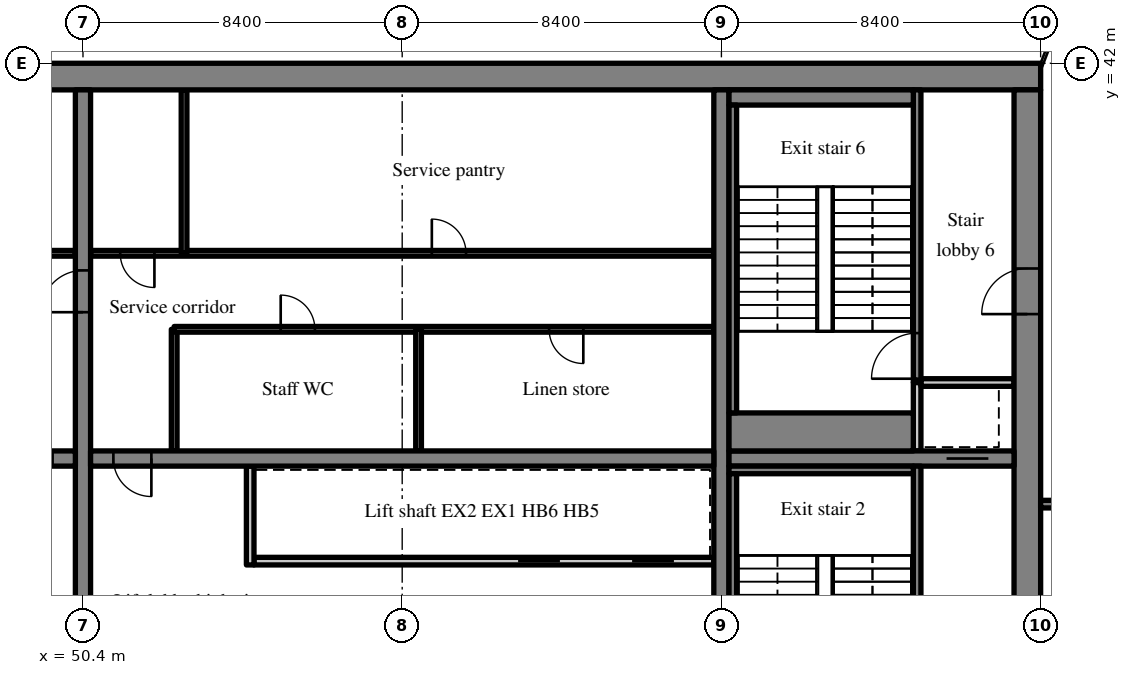
"""IFC4 building model, lengths in metres.
Left out: names, types, materials, properties, quantities, classifications, styles, units other than length and angle.
Written with IfcOpenShell. Run it as: python <this file> out.ifc"""

import sys

from ifc_helpers import new_model, si_unit, direction, frame, frame_2d, origin, place, context, subcontext, project, spatial, rectangle, extrude, source, transform, mapped, element, fill, save


model = new_model("IFC4")
c1 = context("Model", 3, precision=1e-05, world=origin(), true_north=direction((0.0, 1.0)))
c2 = subcontext(c1, "Body", "Model", "MODEL_VIEW")
j1 = project(units=[si_unit("LENGTHUNIT", "METRE"), si_unit("PLANEANGLEUNIT", "RADIAN")], contexts=[c1])
p1 = place(None, origin())
s1 = spatial("IfcSite", under=j1, at=p1, CompositionType="ELEMENT")
p2 = place(p1, origin())
s2 = spatial("IfcBuilding", under=s1, at=p2, CompositionType="ELEMENT")
p3 = place(p2, frame((0.0, 0.0, 155.4)))
s3 = spatial("IfcBuildingStorey", under=s2, at=p3, CompositionType="ELEMENT", Elevation=155.4)
m1 = source(origin(), c2, "Body", "SweptSolid", [
    extrude(rectangle(XDim=50.4, YDim=0.7, at=frame_2d((25.2, 0.0))), origin(), (0.0, 0.0, 1.0), 3.52),
])
p4 = place(p3, frame((25.2, 41.65, 0.0), z_axis=(0.0, 0.0, 1.0), x_axis=(1.0, 0.0, 0.0)))
e1 = element("IfcWall", 1, at=p4, inside=s3, PredefinedType="SHEAR", context=c2, shape_type="MappedRepresentation", body=[
    mapped(m1, transform((0.0, 0.0, 0.0), scale=1.0)),
])
m2 = source(origin(), c2, "Body", "SweptSolid", [
    extrude(rectangle(XDim=18.6, YDim=0.7, at=frame_2d((9.3, 0.0))), origin(), (0.0, 0.0, 1.0), 3.52),
])
p5 = place(p3, frame((75.25, 22.7, 0.0), z_axis=(0.0, 0.0, 1.0), x_axis=(0.0, 1.0, 0.0)))
e2 = element("IfcWall", 2, at=p5, inside=s3, PredefinedType="SHEAR", context=c2, shape_type="MappedRepresentation", body=[
    mapped(m2, transform((0.0, 0.0, 0.0), scale=1.0)),
])
m3 = source(origin(), c2, "Body", "SweptSolid", [
    extrude(rectangle(XDim=1.0, YDim=2.1, at=frame_2d((0.5, 1.05))), frame((0.0, 0.36, 0.0), z_axis=(0.0, -1.0, 0.0), x_axis=(1.0, 0.0, 0.0)), (0.0, 0.0, 1.0), 0.72),
])
p6 = place(p5, frame((2.8, 0.0, 0.0)))
e3 = element("IfcOpeningElement", 3, at=p6, cuts=e2, PredefinedType="OPENING", context=c2, shape_type="MappedRepresentation", body=[
    mapped(m3, transform((0.0, 0.0, 0.0), scale=1.0)),
])
m4 = source(origin(), c2, "Body", "SweptSolid", [
    extrude(rectangle(XDim=1.2, YDim=2.1, at=frame_2d((0.6, 1.05))), frame((0.0, 0.36, 0.0), z_axis=(0.0, -1.0, 0.0), x_axis=(1.0, 0.0, 0.0)), (0.0, 0.0, 1.0), 0.72),
])
p7 = place(p5, frame((12.7, 0.0, 0.0)))
e4 = element("IfcOpeningElement", 4, at=p7, cuts=e2, PredefinedType="OPENING", context=c2, shape_type="MappedRepresentation", body=[
    mapped(m4, transform((0.0, 0.0, 0.0), scale=1.0)),
])
m5 = source(origin(), c2, "Body", "SweptSolid", [
    extrude(rectangle(XDim=18.6, YDim=0.4, at=frame_2d((9.3, 0.0))), origin(), (0.0, 0.0, 1.0), 3.52),
])
p8 = place(p3, frame((50.4, 22.7, 0.0), z_axis=(0.0, 0.0, 1.0), x_axis=(0.0, 1.0, 0.0)))
e5 = element("IfcWall", 5, at=p8, inside=s3, PredefinedType="SHEAR", context=c2, shape_type="MappedRepresentation", body=[
    mapped(m5, transform((0.0, 0.0, 0.0), scale=1.0)),
])
m6 = source(origin(), c2, "Body", "SweptSolid", [
    extrude(rectangle(XDim=1.1, YDim=2.1, at=frame_2d((0.55, 1.05))), frame((0.0, 0.21, 0.0), z_axis=(0.0, -1.0, 0.0), x_axis=(1.0, 0.0, 0.0)), (0.0, 0.0, 1.0), 0.42),
])
p9 = place(p8, frame((12.75, 0.0, 0.0)))
e6 = element("IfcOpeningElement", 6, at=p9, cuts=e5, PredefinedType="OPENING", context=c2, shape_type="MappedRepresentation", body=[
    mapped(m6, transform((0.0, 0.0, 0.0), scale=1.0)),
])
p10 = place(p3, frame((67.2, 22.7, 0.0), z_axis=(0.0, 0.0, 1.0), x_axis=(0.0, 1.0, 0.0)))
e7 = element("IfcWall", 7, at=p10, inside=s3, PredefinedType="SHEAR", context=c2, shape_type="MappedRepresentation", body=[
    mapped(m5, transform((0.0, 0.0, 0.0), scale=1.0)),
])
m7 = source(origin(), c2, "Body", "SweptSolid", [
    extrude(rectangle(XDim=16.4, YDim=0.4, at=frame_2d((8.2, 0.0))), origin(), (0.0, 0.0, 1.0), 3.52),
])
p11 = place(p3, frame((33.8, 31.6, 0.0), z_axis=(0.0, 0.0, 1.0), x_axis=(1.0, 0.0, 0.0)))
e8 = element("IfcWall", 8, at=p11, inside=s3, PredefinedType="SHEAR", context=c2, shape_type="MappedRepresentation", body=[
    mapped(m7, transform((0.0, 0.0, 0.0), scale=1.0)),
])
m8 = source(origin(), c2, "Body", "SweptSolid", [
    extrude(rectangle(XDim=1.0, YDim=2.1, at=frame_2d((0.5, 1.05))), frame((0.0, 0.21, 0.0), z_axis=(0.0, -1.0, 0.0), x_axis=(1.0, 0.0, 0.0)), (0.0, 0.0, 1.0), 0.42),
])
p12 = place(p11, frame((14.8, 0.0, 0.0)))
e9 = element("IfcOpeningElement", 9, at=p12, cuts=e8, PredefinedType="OPENING", context=c2, shape_type="MappedRepresentation", body=[
    mapped(m8, transform((0.0, 0.0, 0.0), scale=1.0)),
])
p13 = place(p3, frame((50.6, 31.6, 0.0), z_axis=(0.0, 0.0, 1.0), x_axis=(1.0, 0.0, 0.0)))
e10 = element("IfcWall", 10, at=p13, inside=s3, PredefinedType="SHEAR", context=c2, shape_type="MappedRepresentation", body=[
    mapped(m7, transform((0.0, 0.0, 0.0), scale=1.0)),
])
p14 = place(p13, frame((0.6, 0.0, 0.0)))
e11 = element("IfcOpeningElement", 11, at=p14, cuts=e10, PredefinedType="OPENING", context=c2, shape_type="MappedRepresentation", body=[
    mapped(m8, transform((0.0, 0.0, 0.0), scale=1.0)),
])
m9 = source(origin(), c2, "Body", "SweptSolid", [
    extrude(rectangle(XDim=7.5, YDim=0.4, at=frame_2d((3.75, 0.0))), origin(), (0.0, 0.0, 1.0), 3.52),
])
p15 = place(p3, frame((67.4, 31.6, 0.0), z_axis=(0.0, 0.0, 1.0), x_axis=(1.0, 0.0, 0.0)))
e12 = element("IfcWall", 12, at=p15, inside=s3, PredefinedType="SHEAR", context=c2, shape_type="MappedRepresentation", body=[
    mapped(m9, transform((0.0, 0.0, 0.0), scale=1.0)),
])
p16 = place(p15, frame((5.725, 0.0, 0.0)))
e13 = element("IfcOpeningElement", 13, at=p16, cuts=e12, PredefinedType="OPENING", context=c2, shape_type="MappedRepresentation", body=[
    mapped(m6, transform((0.0, 0.0, 0.0), scale=1.0)),
])
m10 = source(origin(), c2, "Body", "SweptSolid", [
    extrude(rectangle(XDim=16.4, YDim=0.15, at=frame_2d((8.2, 0.0))), origin(), (0.0, 0.0, 1.0), 3.52),
])
p17 = place(p3, frame((33.8, 37.0, 0.0), z_axis=(0.0, 0.0, 1.0), x_axis=(1.0, 0.0, 0.0)))
e14 = element("IfcWall", 14, at=p17, inside=s3, PredefinedType="PARTITIONING", context=c2, shape_type="MappedRepresentation", body=[
    mapped(m10, transform((0.0, 0.0, 0.0), scale=1.0)),
])
m11 = source(origin(), c2, "Body", "SweptSolid", [
    extrude(rectangle(XDim=0.9, YDim=2.1, at=frame_2d((0.45, 1.05))), frame((0.0, 0.085, 0.0), z_axis=(0.0, -1.0, 0.0), x_axis=(1.0, 0.0, 0.0)), (0.0, 0.0, 1.0), 0.17),
])
p18 = place(p17, frame((0.78, 0.0, 0.0)))
e15 = element("IfcOpeningElement", 15, at=p18, cuts=e14, PredefinedType="OPENING", context=c2, shape_type="MappedRepresentation", body=[
    mapped(m11, transform((0.0, 0.0, 0.0), scale=1.0)),
])
p19 = place(p17, frame((3.65, 0.0, 0.0)))
e16 = element("IfcOpeningElement", 16, at=p19, cuts=e14, PredefinedType="OPENING", context=c2, shape_type="MappedRepresentation", body=[
    mapped(m11, transform((0.0, 0.0, 0.0), scale=1.0)),
])
p20 = place(p17, frame((9.39, 0.0, 0.0)))
e17 = element("IfcOpeningElement", 17, at=p20, cuts=e14, PredefinedType="OPENING", context=c2, shape_type="MappedRepresentation", body=[
    mapped(m11, transform((0.0, 0.0, 0.0), scale=1.0)),
])
p21 = place(p17, frame((14.72, 0.0, 0.0)))
e18 = element("IfcOpeningElement", 18, at=p21, cuts=e14, PredefinedType="OPENING", context=c2, shape_type="MappedRepresentation", body=[
    mapped(m11, transform((0.0, 0.0, 0.0), scale=1.0)),
])
m12 = source(origin(), c2, "Body", "SweptSolid", [
    extrude(rectangle(XDim=12.1, YDim=0.2, at=frame_2d((6.05, 0.0))), origin(), (0.0, 0.0, 1.0), 3.52),
])
p22 = place(p3, frame((67.0, 28.9, 0.0), z_axis=(0.0, 0.0, 1.0), x_axis=(-1.0, 0.0, 0.0)))
e19 = element("IfcWall", 19, at=p22, inside=s3, PredefinedType="SOLIDWALL", context=c2, shape_type="MappedRepresentation", body=[
    mapped(m12, transform((0.0, 0.0, 0.0), scale=1.0)),
])
m13 = source(origin(), c2, "Body", "SweptSolid", [
    extrude(rectangle(XDim=1.1, YDim=2.1, at=frame_2d((0.55, 1.05))), frame((0.0, 0.11, 0.0), z_axis=(0.0, -1.0, 0.0), x_axis=(1.0, 0.0, 0.0)), (0.0, 0.0, 1.0), 0.22),
])
p23 = place(p22, frame((1.05, 0.0, 0.0)))
e20 = element("IfcOpeningElement", 20, at=p23, cuts=e19, PredefinedType="OPENING", context=c2, shape_type="MappedRepresentation", body=[
    mapped(m13, transform((0.0, 0.0, 0.0), scale=1.0)),
])
p24 = place(p22, frame((4.05, 0.0, 0.0)))
e21 = element("IfcOpeningElement", 21, at=p24, cuts=e19, PredefinedType="OPENING", context=c2, shape_type="MappedRepresentation", body=[
    mapped(m13, transform((0.0, 0.0, 0.0), scale=1.0)),
])
m14 = source(origin(), c2, "Body", "SweptSolid", [
    extrude(rectangle(XDim=2.6, YDim=0.2, at=frame_2d((1.3, 0.0))), origin(), (0.0, 0.0, 1.0), 3.52),
])
p25 = place(p3, frame((54.8, 28.8, 0.0), z_axis=(0.0, 0.0, 1.0), x_axis=(0.0, 1.0, 0.0)))
e22 = element("IfcWall", 22, at=p25, inside=s3, PredefinedType="SOLIDWALL", context=c2, shape_type="MappedRepresentation", body=[
    mapped(m14, transform((0.0, 0.0, 0.0), scale=1.0)),
])
m15 = source(origin(), c2, "Body", "SweptSolid", [
    extrude(rectangle(XDim=3.2, YDim=0.15, at=frame_2d((1.6, 0.0))), origin(), (0.0, 0.0, 1.0), 3.52),
])
p26 = place(p3, frame((52.8, 31.8, 0.0), z_axis=(0.0, 0.0, 1.0), x_axis=(0.0, 1.0, 0.0)))
e23 = element("IfcWall", 23, at=p26, inside=s3, PredefinedType="PARTITIONING", context=c2, shape_type="MappedRepresentation", body=[
    mapped(m15, transform((0.0, 0.0, 0.0), scale=1.0)),
])
m16 = source(origin(), c2, "Body", "SweptSolid", [
    extrude(rectangle(XDim=14.2, YDim=0.15, at=frame_2d((7.1, 0.0))), origin(), (0.0, 0.0, 1.0), 3.52),
])
p27 = place(p3, frame((67.0, 35.0, 0.0), z_axis=(0.0, 0.0, 1.0), x_axis=(-1.0, 0.0, 0.0)))
e24 = element("IfcWall", 24, at=p27, inside=s3, PredefinedType="PARTITIONING", context=c2, shape_type="MappedRepresentation", body=[
    mapped(m16, transform((0.0, 0.0, 0.0), scale=1.0)),
])
p28 = place(p27, frame((3.434, 0.0, 0.0)))
e25 = element("IfcOpeningElement", 25, at=p28, cuts=e24, PredefinedType="OPENING", context=c2, shape_type="MappedRepresentation", body=[
    mapped(m11, transform((0.0, 0.0, 0.0), scale=1.0)),
])
p29 = place(p27, frame((10.497, 0.0, 0.0)))
e26 = element("IfcOpeningElement", 26, at=p29, cuts=e24, PredefinedType="OPENING", context=c2, shape_type="MappedRepresentation", body=[
    mapped(m11, transform((0.0, 0.0, 0.0), scale=1.0)),
])
p30 = place(p3, frame((67.0, 37.0, 0.0), z_axis=(0.0, 0.0, 1.0), x_axis=(-1.0, 0.0, 0.0)))
e27 = element("IfcWall", 27, at=p30, inside=s3, PredefinedType="PARTITIONING", context=c2, shape_type="MappedRepresentation", body=[
    mapped(m10, transform((0.0, 0.0, 0.0), scale=1.0)),
])
p31 = place(p30, frame((6.52, 0.0, 0.0)))
e28 = element("IfcOpeningElement", 28, at=p31, cuts=e27, PredefinedType="OPENING", context=c2, shape_type="MappedRepresentation", body=[
    mapped(m11, transform((0.0, 0.0, 0.0), scale=1.0)),
])
p32 = place(p30, frame((14.72, 0.0, 0.0)))
e29 = element("IfcOpeningElement", 29, at=p32, cuts=e27, PredefinedType="OPENING", context=c2, shape_type="MappedRepresentation", body=[
    mapped(m11, transform((0.0, 0.0, 0.0), scale=1.0)),
])
p33 = place(p3, frame((59.231, 31.8, 0.0), z_axis=(0.0, 0.0, 1.0), x_axis=(0.0, 1.0, 0.0)))
e30 = element("IfcWall", 30, at=p33, inside=s3, PredefinedType="PARTITIONING", context=c2, shape_type="MappedRepresentation", body=[
    mapped(m15, transform((0.0, 0.0, 0.0), scale=1.0)),
])
m17 = source(origin(), c2, "Body", "SweptSolid", [
    extrude(rectangle(XDim=4.3, YDim=0.15, at=frame_2d((2.15, 0.0))), origin(), (0.0, 0.0, 1.0), 3.52),
])
p34 = place(p3, frame((53.06, 37.0, 0.0), z_axis=(0.0, 0.0, 1.0), x_axis=(0.0, 1.0, 0.0)))
e31 = element("IfcWall", 31, at=p34, inside=s3, PredefinedType="PARTITIONING", context=c2, shape_type="MappedRepresentation", body=[
    mapped(m17, transform((0.0, 0.0, 0.0), scale=1.0)),
])
m18 = source(origin(), c2, "Body", "SweptSolid", [
    extrude(rectangle(XDim=8.7, YDim=0.2, at=frame_2d((4.35, 0.0))), origin(), (0.0, 0.0, 1.0), 3.52),
])
p35 = place(p3, frame((72.35, 22.7, 0.0), z_axis=(0.0, 0.0, 1.0), x_axis=(0.0, 1.0, 0.0)))
e32 = element("IfcWall", 32, at=p35, inside=s3, PredefinedType="SOLIDWALL", context=c2, shape_type="MappedRepresentation", body=[
    mapped(m18, transform((0.0, 0.0, 0.0), scale=1.0)),
])
m19 = source(origin(), c2, "Body", "SweptSolid", [
    extrude(rectangle(XDim=1.2, YDim=2.1, at=frame_2d((0.6, 1.05))), frame((0.0, 0.11, 0.0), z_axis=(0.0, -1.0, 0.0), x_axis=(1.0, 0.0, 0.0)), (0.0, 0.0, 1.0), 0.22),
])
p36 = place(p35, frame((0.9, 0.0, 0.0)))
e33 = element("IfcOpeningElement", 33, at=p36, cuts=e32, PredefinedType="OPENING", context=c2, shape_type="MappedRepresentation", body=[
    mapped(m19, transform((0.0, 0.0, 0.0), scale=1.0)),
])
m20 = source(origin(), c2, "Body", "SweptSolid", [
    extrude(rectangle(XDim=1.8, YDim=0.2, at=frame_2d((0.9, 0.0))), origin(), (0.0, 0.0, 1.0), 3.52),
])
p37 = place(p3, frame((72.35, 31.8, 0.0), z_axis=(0.0, 0.0, 1.0), x_axis=(0.0, 1.0, 0.0)))
e34 = element("IfcWall", 34, at=p37, inside=s3, PredefinedType="SOLIDWALL", context=c2, shape_type="MappedRepresentation", body=[
    mapped(m20, transform((0.0, 0.0, 0.0), scale=1.0)),
])
m21 = source(origin(), c2, "Body", "SweptSolid", [
    extrude(rectangle(XDim=2.45, YDim=0.2, at=frame_2d((1.225, 0.0))), origin(), (0.0, 0.0, 1.0), 3.52),
])
p38 = place(p3, frame((72.45, 33.6, 0.0), z_axis=(0.0, 0.0, 1.0), x_axis=(1.0, 0.0, 0.0)))
e35 = element("IfcWall", 35, at=p38, inside=s3, PredefinedType="SOLIDWALL", context=c2, shape_type="MappedRepresentation", body=[
    mapped(m21, transform((0.0, 0.0, 0.0), scale=1.0)),
])
m22 = source(origin(), c2, "Body", "SweptSolid", [
    extrude(rectangle(XDim=7.7, YDim=0.2, at=frame_2d((3.85, 0.0))), origin(), (0.0, 0.0, 1.0), 3.52),
])
p39 = place(p3, frame((72.35, 33.6, 0.0), z_axis=(0.0, 0.0, 1.0), x_axis=(0.0, 1.0, 0.0)))
e36 = element("IfcWall", 36, at=p39, inside=s3, PredefinedType="SOLIDWALL", context=c2, shape_type="MappedRepresentation", body=[
    mapped(m22, transform((0.0, 0.0, 0.0), scale=1.0)),
])
p40 = place(p39, frame((0.1, 0.0, 0.0)))
e37 = element("IfcOpeningElement", 37, at=p40, cuts=e36, PredefinedType="OPENING", context=c2, shape_type="MappedRepresentation", body=[
    mapped(m19, transform((0.0, 0.0, 0.0), scale=1.0)),
])
m23 = source(origin(), c2, "Body", "SweptSolid", [
    extrude(rectangle(XDim=8.25, YDim=0.2, at=frame_2d((4.125, 0.0))), origin(), (0.0, 0.0, 1.0), 3.52),
])
p41 = place(p3, frame((83.85, 30.4, 0.0), z_axis=(0.0, 0.0, 1.0), x_axis=(-1.0, 0.0, 0.0)))
e38 = element("IfcWall", 38, at=p41, inside=s3, PredefinedType="SOLIDWALL", context=c2, shape_type="MappedRepresentation", body=[
    mapped(m23, transform((0.0, 0.0, 0.0), scale=1.0)),
])
m24 = source(origin(), c2, "Body", "SweptSolid", [
    extrude(rectangle(XDim=1.0, YDim=2.1, at=frame_2d((0.5, 1.05))), frame((0.0, 0.11, 0.0), z_axis=(0.0, -1.0, 0.0), x_axis=(1.0, 0.0, 0.0)), (0.0, 0.0, 1.0), 0.22),
])
p42 = place(p41, frame((6.15, 0.0, 0.0)))
e39 = element("IfcOpeningElement", 39, at=p42, cuts=e38, PredefinedType="OPENING", context=c2, shape_type="MappedRepresentation", body=[
    mapped(m24, transform((0.0, 0.0, 0.0), scale=1.0)),
])
m25 = source(origin(), c2, "Body", "SweptSolid", [
    extrude(rectangle(XDim=4.85, YDim=0.2, at=frame_2d((2.425, 0.0))), origin(), (0.0, 0.0, 1.0), 3.52),
])
p43 = place(p3, frame((67.4, 31.3, 0.0), z_axis=(0.0, 0.0, 1.0), x_axis=(1.0, 0.0, 0.0)))
e40 = element("IfcWall", 40, at=p43, inside=s3, PredefinedType="SOLIDWALL", context=c2, shape_type="MappedRepresentation", body=[
    mapped(m25, transform((0.0, 0.0, 0.0), scale=1.0)),
])
m26 = source(origin(), c2, "Body", "SweptSolid", [
    extrude(rectangle(XDim=8.1, YDim=0.2, at=frame_2d((4.05, 0.0))), origin(), (0.0, 0.0, 1.0), 3.52),
])
p44 = place(p3, frame((67.5, 23.1, 0.0), z_axis=(0.0, 0.0, 1.0), x_axis=(0.0, 1.0, 0.0)))
e41 = element("IfcWall", 41, at=p44, inside=s3, PredefinedType="SOLIDWALL", context=c2, shape_type="MappedRepresentation", body=[
    mapped(m26, transform((0.0, 0.0, 0.0), scale=1.0)),
])
m27 = source(origin(), c2, "Body", "SweptSolid", [
    extrude(rectangle(XDim=4.85, YDim=0.4, at=frame_2d((2.425, 0.0))), origin(), (0.0, 0.0, 1.0), 3.52),
])
p45 = place(p3, frame((67.4, 41.1, 0.0), z_axis=(0.0, 0.0, 1.0), x_axis=(1.0, 0.0, 0.0)))
e42 = element("IfcWall", 42, at=p45, inside=s3, PredefinedType="SOLIDWALL", context=c2, shape_type="MappedRepresentation", body=[
    mapped(m27, transform((0.0, 0.0, 0.0), scale=1.0)),
])
m28 = source(origin(), c2, "Body", "SweptSolid", [
    extrude(rectangle(XDim=4.85, YDim=1.0, at=frame_2d((2.425, 0.0))), origin(), (0.0, 0.0, 1.0), 3.52),
])
p46 = place(p3, frame((67.4, 32.3, 0.0), z_axis=(0.0, 0.0, 1.0), x_axis=(1.0, 0.0, 0.0)))
e43 = element("IfcWall", 43, at=p46, inside=s3, PredefinedType="SOLIDWALL", context=c2, shape_type="MappedRepresentation", body=[
    mapped(m28, transform((0.0, 0.0, 0.0), scale=1.0)),
])
p47 = place(p3, frame((67.5, 32.8, 0.0), z_axis=(0.0, 0.0, 1.0), x_axis=(0.0, 1.0, 0.0)))
e44 = element("IfcWall", 44, at=p47, inside=s3, PredefinedType="SOLIDWALL", context=c2, shape_type="MappedRepresentation", body=[
    mapped(m26, transform((0.0, 0.0, 0.0), scale=1.0)),
])
m29 = source(origin(), c2, "Body", "SweptSolid", [
    extrude(rectangle(XDim=1.0, YDim=2.1, at=frame_2d((0.5, 1.05))), frame((0.0, 0.025, 0.0), z_axis=(0.0, -1.0, 0.0), x_axis=(1.0, 0.0, 0.0)), (0.0, 0.0, 1.0), 0.05),
])
p48 = place(p14, origin())
e45 = element("IfcDoor", 45, at=p48, inside=s3, OperationType="SINGLE_SWING_RIGHT", PredefinedType="DOOR", context=c2, shape_type="MappedRepresentation", body=[
    mapped(m29, transform((0.0, 0.0, 0.0), scale=1.0)),
])
fill(e11, e45)
m30 = source(origin(), c2, "Body", "SweptSolid", [
    extrude(rectangle(XDim=1.1, YDim=2.1, at=frame_2d((0.55, 1.05))), frame((0.0, 0.025, 0.0), z_axis=(0.0, -1.0, 0.0), x_axis=(1.0, 0.0, 0.0)), (0.0, 0.0, 1.0), 0.05),
])
p49 = place(p23, origin())
e46 = element("IfcDoor", 46, at=p49, inside=s3, OperationType="SLIDING_TO_RIGHT", PredefinedType="DOOR", context=c2, shape_type="MappedRepresentation", body=[
    mapped(m30, transform((0.0, 0.0, 0.0), scale=1.0)),
])
fill(e20, e46)
p50 = place(p24, origin())
e47 = element("IfcDoor", 47, at=p50, inside=s3, OperationType="SLIDING_TO_LEFT", PredefinedType="DOOR", context=c2, shape_type="MappedRepresentation", body=[
    mapped(m30, transform((0.0, 0.0, 0.0), scale=1.0)),
])
fill(e21, e47)
m31 = source(origin(), c2, "Body", "SweptSolid", [
    extrude(rectangle(XDim=0.9, YDim=2.1, at=frame_2d((0.45, 1.05))), frame((0.0, 0.025, 0.0), z_axis=(0.0, -1.0, 0.0), x_axis=(1.0, 0.0, 0.0)), (0.0, 0.0, 1.0), 0.05),
])
p51 = place(p28, origin())
e48 = element("IfcDoor", 48, at=p51, inside=s3, OperationType="SINGLE_SWING_LEFT", PredefinedType="DOOR", context=c2, shape_type="MappedRepresentation", body=[
    mapped(m31, transform((0.0, 0.0, 0.0), scale=1.0)),
])
fill(e25, e48)
p52 = place(p29, origin())
e49 = element("IfcDoor", 49, at=p52, inside=s3, OperationType="SINGLE_SWING_RIGHT", PredefinedType="DOOR", context=c2, shape_type="MappedRepresentation", body=[
    mapped(m31, transform((0.0, 0.0, 0.0), scale=1.0)),
])
fill(e26, e49)
p53 = place(p31, origin())
e50 = element("IfcDoor", 50, at=p53, inside=s3, OperationType="SINGLE_SWING_RIGHT", PredefinedType="DOOR", context=c2, shape_type="MappedRepresentation", body=[
    mapped(m31, transform((0.0, 0.0, 0.0), scale=1.0)),
])
fill(e28, e50)
p54 = place(p32, origin())
e51 = element("IfcDoor", 51, at=p54, inside=s3, OperationType="SINGLE_SWING_LEFT", PredefinedType="DOOR", context=c2, shape_type="MappedRepresentation", body=[
    mapped(m31, transform((0.0, 0.0, 0.0), scale=1.0)),
])
fill(e29, e51)
p55 = place(p16, origin())
e52 = element("IfcDoor", 52, at=p55, inside=s3, OperationType="SLIDING_TO_RIGHT", PredefinedType="DOOR", context=c2, shape_type="MappedRepresentation", body=[
    mapped(m30, transform((0.0, 0.0, 0.0), scale=1.0)),
])
fill(e13, e52)
m32 = source(origin(), c2, "Body", "SweptSolid", [
    extrude(rectangle(XDim=1.2, YDim=2.1, at=frame_2d((0.6, 1.05))), frame((0.0, 0.025, 0.0), z_axis=(0.0, -1.0, 0.0), x_axis=(1.0, 0.0, 0.0)), (0.0, 0.0, 1.0), 0.05),
])
p56 = place(p40, origin())
e53 = element("IfcDoor", 53, at=p56, inside=s3, OperationType="SINGLE_SWING_LEFT", PredefinedType="DOOR", context=c2, shape_type="MappedRepresentation", body=[
    mapped(m32, transform((0.0, 0.0, 0.0), scale=1.0)),
])
fill(e37, e53)
p57 = place(p7, origin())
e54 = element("IfcDoor", 54, at=p57, inside=s3, OperationType="SINGLE_SWING_LEFT", PredefinedType="DOOR", context=c2, shape_type="MappedRepresentation", body=[
    mapped(m32, transform((0.0, 0.0, 0.0), scale=1.0)),
])
fill(e4, e54)
p58 = place(p9, origin())
e55 = element("IfcDoor", 55, at=p58, inside=s3, OperationType="SINGLE_SWING_LEFT", PredefinedType="DOOR", context=c2, shape_type="MappedRepresentation", body=[
    mapped(m30, transform((0.0, 0.0, 0.0), scale=1.0)),
])
fill(e6, e55)
save(model, sys.argv[1])
